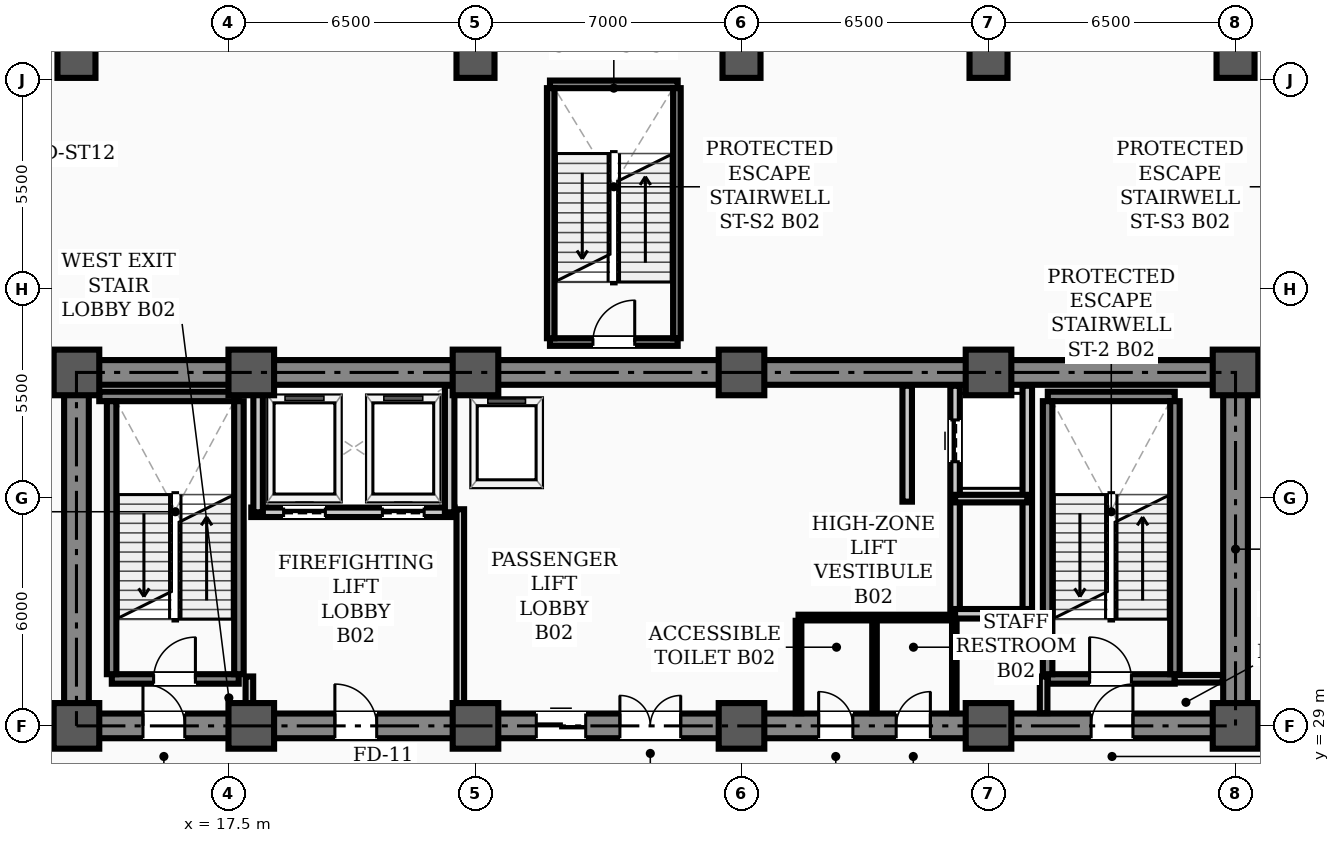
"""IFC4 building model, lengths in metres.
Left out: names, types, materials, properties, quantities, classifications, styles, units other than length and angle.
Written with IfcOpenShell. Run it as: python <this file> out.ifc"""

import sys

from ifc_helpers import new_model, si_unit, direction, frame, frame_2d, origin, origin_2d, place, context, subcontext, project, spatial, rectangle, hollow_rectangle, extrude, element, fill, save


model = new_model("IFC4")
c1 = context("Model", 3, precision=1e-05, world=origin(), true_north=direction((0.0, 1.0)))
c2 = subcontext(c1, "Body", "Model", "MODEL_VIEW")
j1 = project(units=[si_unit("LENGTHUNIT", "METRE"), si_unit("PLANEANGLEUNIT", "RADIAN")], contexts=[c1])
p1 = place(None, origin())
s1 = spatial("IfcSite", under=j1, at=p1, CompositionType="ELEMENT")
p2 = place(p1, origin())
s2 = spatial("IfcBuilding", under=s1, at=p2, CompositionType="ELEMENT")
p3 = place(p2, frame((0.0, 0.0, -10.2)))
s3 = spatial("IfcBuildingStorey", under=s2, at=p3, CompositionType="ELEMENT", Elevation=-10.2)
for number, where, z_axis, x_axis in (
    (1, (13.5, 29.0, 0.0), (0.0, 0.0, 1.0), (1.0, 0.0, 0.0)),
    (2, (13.5, 38.3, 0.0), (0.0, 0.0, 1.0), (1.0, 0.0, 0.0)),
    (3, (18.1, 29.0, 0.0), (0.0, 0.0, 1.0), (1.0, 0.0, 0.0)),
    (4, (18.1, 38.3, 0.0), (0.0, 0.0, 1.0), (1.0, 0.0, 0.0)),
    (5, (24.0, 29.0, 0.0), (0.0, 0.0, 1.0), (1.0, 0.0, 0.0)),
    (6, (24.0, 38.3, 0.0), (0.0, 0.0, 1.0), (1.0, 0.0, 0.0)),
    (7, (31.0, 29.0, 0.0), (0.0, 0.0, 1.0), (1.0, 0.0, 0.0)),
    (8, (31.0, 38.3, 0.0), (0.0, 0.0, 1.0), (1.0, 0.0, 0.0)),
    (9, (37.5, 29.0, 0.0), (0.0, 0.0, 1.0), (1.0, 0.0, 0.0)),
    (10, (37.5, 38.3, 0.0), (0.0, 0.0, 1.0), (1.0, 0.0, 0.0)),
    (11, (44.0, 29.0, 0.0), (0.0, 0.0, 1.0), (1.0, 0.0, 0.0)),
    (12, (44.0, 38.3, 0.0), (0.0, 0.0, 1.0), (1.0, 0.0, 0.0)),
):
    element("IfcColumn", number, at=place(p3, frame(where, z_axis=z_axis, x_axis=x_axis)), inside=s3, PredefinedType="COLUMN", context=c2, shape_type="SweptSolid", body=[
        extrude(hollow_rectangle(XDim=1.2, YDim=1.2, WallThickness=0.04, InnerFilletRadius=0.02, OuterFilletRadius=0.06, at=origin_2d()), origin(), (0.0, 0.0, 1.0), 5.2),
    ])
for number, where, z_axis, x_axis in (
    (13, (13.5, 46.55, 0.0), (0.0, 0.0, 1.0), (1.0, 0.0, 0.0)),
    (14, (24.0, 46.55, 0.0), (0.0, 0.0, 1.0), (1.0, 0.0, 0.0)),
    (15, (31.0, 46.55, 0.0), (0.0, 0.0, 1.0), (1.0, 0.0, 0.0)),
    (16, (37.5, 46.55, 0.0), (0.0, 0.0, 1.0), (1.0, 0.0, 0.0)),
    (17, (44.0, 46.55, 0.0), (0.0, 0.0, 1.0), (1.0, 0.0, 0.0)),
):
    element("IfcColumn", number, at=place(p3, frame(where, z_axis=z_axis, x_axis=x_axis)), inside=s3, PredefinedType="COLUMN", context=c2, shape_type="SweptSolid", body=[
        extrude(rectangle(XDim=1.0, YDim=1.0, at=origin_2d()), origin(), (0.0, 0.0, 1.0), 5.2),
    ])
p4 = place(p3, frame((13.5, 29.0, 0.0), z_axis=(0.0, 0.0, 1.0), x_axis=(1.0, 0.0, 0.0)))
e18 = element("IfcWall", 18, at=p4, inside=s3, PredefinedType="SHEAR", context=c2, shape_type="SweptSolid", body=[
    extrude(rectangle(XDim=30.5, YDim=0.65, at=frame_2d((15.25, 0.0))), origin(), (0.0, 0.0, 1.0), 4.92),
])
p5 = place(p4, frame((1.75, 0.0, 0.0)))
e19 = element("IfcOpeningElement", 19, at=p5, cuts=e18, PredefinedType="OPENING", context=c2, shape_type="SweptSolid", body=[
    extrude(rectangle(XDim=1.1, YDim=2.08, at=frame_2d((0.55, 1.04))), frame((0.0, 0.335, 0.0), z_axis=(0.0, -1.0, 0.0), x_axis=(1.0, 0.0, 0.0)), (0.0, 0.0, 1.0), 0.67),
])
p6 = place(p4, frame((26.7, 0.0, 0.0)))
e20 = element("IfcOpeningElement", 20, at=p6, cuts=e18, PredefinedType="OPENING", context=c2, shape_type="SweptSolid", body=[
    extrude(rectangle(XDim=1.1, YDim=2.08, at=frame_2d((0.55, 1.04))), frame((0.0, 0.335, 0.0), z_axis=(0.0, -1.0, 0.0), x_axis=(1.0, 0.0, 0.0)), (0.0, 0.0, 1.0), 0.67),
])
p7 = place(p4, frame((6.8, 0.0, 0.0)))
e21 = element("IfcOpeningElement", 21, at=p7, cuts=e18, PredefinedType="OPENING", context=c2, shape_type="SweptSolid", body=[
    extrude(rectangle(XDim=1.1, YDim=2.08, at=frame_2d((0.55, 1.04))), frame((0.0, 0.335, 0.0), z_axis=(0.0, -1.0, 0.0), x_axis=(1.0, 0.0, 0.0)), (0.0, 0.0, 1.0), 0.67),
])
p8 = place(p4, frame((14.3, 0.0, 0.0)))
e22 = element("IfcOpeningElement", 22, at=p8, cuts=e18, PredefinedType="OPENING", context=c2, shape_type="SweptSolid", body=[
    extrude(rectangle(XDim=1.6, YDim=2.08, at=frame_2d((0.8, 1.04))), frame((0.0, 0.335, 0.0), z_axis=(0.0, -1.0, 0.0), x_axis=(1.0, 0.0, 0.0)), (0.0, 0.0, 1.0), 0.67),
])
p9 = place(p4, frame((19.53, 0.0, 0.0)))
e23 = element("IfcOpeningElement", 23, at=p9, cuts=e18, PredefinedType="OPENING", context=c2, shape_type="SweptSolid", body=[
    extrude(rectangle(XDim=0.9, YDim=2.08, at=frame_2d((0.45, 1.04))), frame((0.0, 0.335, 0.0), z_axis=(0.0, -1.0, 0.0), x_axis=(1.0, 0.0, 0.0)), (0.0, 0.0, 1.0), 0.67),
])
p10 = place(p4, frame((21.57, 0.0, 0.0)))
e24 = element("IfcOpeningElement", 24, at=p10, cuts=e18, PredefinedType="OPENING", context=c2, shape_type="SweptSolid", body=[
    extrude(rectangle(XDim=0.9, YDim=2.08, at=frame_2d((0.45, 1.04))), frame((0.0, 0.335, 0.0), z_axis=(0.0, -1.0, 0.0), x_axis=(1.0, 0.0, 0.0)), (0.0, 0.0, 1.0), 0.67),
])
p11 = place(p4, frame((12.1, 0.0, 0.0)))
e25 = element("IfcOpeningElement", 25, at=p11, cuts=e18, PredefinedType="OPENING", context=c2, shape_type="SweptSolid", body=[
    extrude(rectangle(XDim=1.3, YDim=2.08, at=frame_2d((0.65, 1.04))), frame((0.0, 0.335, 0.0), z_axis=(0.0, -1.0, 0.0), x_axis=(1.0, 0.0, 0.0)), (0.0, 0.0, 1.0), 0.67),
])
p12 = place(p3, frame((13.5, 38.3, 0.0), z_axis=(0.0, 0.0, 1.0), x_axis=(1.0, 0.0, 0.0)))
e26 = element("IfcWall", 26, at=p12, inside=s3, PredefinedType="SHEAR", context=c2, shape_type="SweptSolid", body=[
    extrude(rectangle(XDim=30.5, YDim=0.65, at=frame_2d((15.25, 0.0))), origin(), (0.0, 0.0, 1.0), 4.92),
])
for number, where, z_axis, x_axis in (
    (27, (13.5, 29.35, 0.0), (0.0, 0.0, 1.0), (0.0, 1.0, 0.0)),
    (28, (44.0, 29.35, 0.0), (0.0, 0.0, 1.0), (0.0, 1.0, 0.0)),
):
    element("IfcWall", number, at=place(p3, frame(where, z_axis=z_axis, x_axis=x_axis)), inside=s3, PredefinedType="SHEAR", context=c2, shape_type="SweptSolid", body=[
        extrude(rectangle(XDim=8.6, YDim=0.65, at=frame_2d((4.3, 0.0))), origin(), (0.0, 0.0, 1.0), 4.92),
    ])
p13 = place(p3, frame((14.43, 30.235, 0.0), z_axis=(0.0, 0.0, 1.0), x_axis=(1.0, 0.0, 0.0)))
e29 = element("IfcWall", 29, at=p13, inside=s3, PredefinedType="STANDARD", context=c2, shape_type="SweptSolid", body=[
    extrude(rectangle(XDim=3.34, YDim=0.25, at=frame_2d((1.67, 0.0))), origin(), (0.0, 0.0, 1.0), 4.92),
])
p14 = place(p13, frame((1.1, 0.0, 0.0)))
e30 = element("IfcOpeningElement", 30, at=p14, cuts=e29, PredefinedType="OPENING", context=c2, shape_type="SweptSolid", body=[
    extrude(rectangle(XDim=1.1, YDim=2.08, at=frame_2d((0.55, 1.04))), frame((0.0, 0.135, 0.0), z_axis=(0.0, -1.0, 0.0), x_axis=(1.0, 0.0, 0.0)), (0.0, 0.0, 1.0), 0.27),
])
p15 = place(p3, frame((14.1, 37.669, 0.0), z_axis=(0.0, 0.0, 1.0), x_axis=(1.0, 0.0, 0.0)))
e31 = element("IfcWall", 31, at=p15, inside=s3, PredefinedType="STANDARD", context=c2, shape_type="SweptSolid", body=[
    extrude(rectangle(XDim=3.67, YDim=0.25, at=frame_2d((1.835, 0.0))), origin(), (0.0, 0.0, 1.0), 4.92),
])
for number, where, z_axis, x_axis in (
    (32, (14.425, 30.36, 0.0), (0.0, 0.0, 1.0), (0.0, 1.0, 0.0)),
    (33, (17.775, 30.36, 0.0), (0.0, 0.0, 1.0), (0.0, 1.0, 0.0)),
):
    element("IfcWall", number, at=place(p3, frame(where, z_axis=z_axis, x_axis=x_axis)), inside=s3, PredefinedType="STANDARD", context=c2, shape_type="SweptSolid", body=[
        extrude(rectangle(XDim=7.184, YDim=0.25, at=frame_2d((3.592, 0.0))), origin(), (0.0, 0.0, 1.0), 4.92),
    ])
p16 = place(p3, frame((39.06, 30.235, 0.0), z_axis=(0.0, 0.0, 1.0), x_axis=(1.0, 0.0, 0.0)))
e34 = element("IfcWall", 34, at=p16, inside=s3, PredefinedType="STANDARD", context=c2, shape_type="SweptSolid", body=[
    extrude(rectangle(XDim=3.34, YDim=0.25, at=frame_2d((1.67, 0.0))), origin(), (0.0, 0.0, 1.0), 4.92),
])
p17 = place(p16, frame((1.1, 0.0, 0.0)))
e35 = element("IfcOpeningElement", 35, at=p17, cuts=e34, PredefinedType="OPENING", context=c2, shape_type="SweptSolid", body=[
    extrude(rectangle(XDim=1.1, YDim=2.08, at=frame_2d((0.55, 1.04))), frame((0.0, 0.135, 0.0), z_axis=(0.0, -1.0, 0.0), x_axis=(1.0, 0.0, 0.0)), (0.0, 0.0, 1.0), 0.27),
])
p18 = place(p3, frame((39.06, 37.669, 0.0), z_axis=(0.0, 0.0, 1.0), x_axis=(1.0, 0.0, 0.0)))
e36 = element("IfcWall", 36, at=p18, inside=s3, PredefinedType="STANDARD", context=c2, shape_type="SweptSolid", body=[
    extrude(rectangle(XDim=3.34, YDim=0.25, at=frame_2d((1.67, 0.0))), origin(), (0.0, 0.0, 1.0), 4.92),
])
for number, where, z_axis, x_axis in (
    (37, (39.055, 30.36, 0.0), (0.0, 0.0, 1.0), (0.0, 1.0, 0.0)),
    (38, (42.405, 30.36, 0.0), (0.0, 0.0, 1.0), (0.0, 1.0, 0.0)),
):
    element("IfcWall", number, at=place(p3, frame(where, z_axis=z_axis, x_axis=x_axis)), inside=s3, PredefinedType="STANDARD", context=c2, shape_type="SweptSolid", body=[
        extrude(rectangle(XDim=7.184, YDim=0.25, at=frame_2d((3.592, 0.0))), origin(), (0.0, 0.0, 1.0), 4.92),
    ])
p19 = place(p3, frame((18.1, 34.62, 0.0), z_axis=(0.0, 0.0, 1.0), x_axis=(1.0, 0.0, 0.0)))
e39 = element("IfcWall", 39, at=p19, inside=s3, PredefinedType="STANDARD", context=c2, shape_type="SweptSolid", body=[
    extrude(rectangle(XDim=5.35, YDim=0.25, at=frame_2d((2.675, 0.0))), origin(), (0.0, 0.0, 1.0), 4.2),
])
p20 = place(p19, frame((0.85, 0.0, 0.0)))
e40 = element("IfcOpeningElement", 40, at=p20, cuts=e39, PredefinedType="OPENING", context=c2, shape_type="SweptSolid", body=[
    extrude(rectangle(XDim=1.1, YDim=2.08, at=frame_2d((0.55, 1.04))), frame((0.0, 0.135, 0.0), z_axis=(0.0, -1.0, 0.0), x_axis=(1.0, 0.0, 0.0)), (0.0, 0.0, 1.0), 0.27),
])
p21 = place(p19, frame((3.45, 0.0, 0.0)))
e41 = element("IfcOpeningElement", 41, at=p21, cuts=e39, PredefinedType="OPENING", context=c2, shape_type="SweptSolid", body=[
    extrude(rectangle(XDim=1.1, YDim=2.08, at=frame_2d((0.55, 1.04))), frame((0.0, 0.135, 0.0), z_axis=(0.0, -1.0, 0.0), x_axis=(1.0, 0.0, 0.0)), (0.0, 0.0, 1.0), 0.27),
])
p22 = place(p3, frame((36.62, 31.95, 0.0), z_axis=(0.0, 0.0, 1.0), x_axis=(0.0, 1.0, 0.0)))
e42 = element("IfcWall", 42, at=p22, inside=s3, PredefinedType="STANDARD", context=c2, shape_type="SweptSolid", body=[
    extrude(rectangle(XDim=6.0, YDim=0.25, at=frame_2d((3.0, 0.0))), origin(), (0.0, 0.0, 1.0), 4.1),
])
p23 = place(p22, frame((4.0, 0.0, 0.0)))
e43 = element("IfcOpeningElement", 43, at=p23, cuts=e42, PredefinedType="OPENING", context=c2, shape_type="SweptSolid", body=[
    extrude(rectangle(XDim=1.1, YDim=2.08, at=frame_2d((0.55, 1.04))), frame((0.0, 0.135, 0.0), z_axis=(0.0, -1.0, 0.0), x_axis=(1.0, 0.0, 0.0)), (0.0, 0.0, 1.0), 0.27),
])
p24 = place(p3, frame((38.52, 31.95, 0.0), z_axis=(0.0, 0.0, 1.0), x_axis=(0.0, 1.0, 0.0)))
e44 = element("IfcWall", 44, at=p24, inside=s3, PredefinedType="STANDARD", context=c2, shape_type="SweptSolid", body=[
    extrude(rectangle(XDim=6.0, YDim=0.25, at=frame_2d((3.0, 0.0))), origin(), (0.0, 0.0, 1.0), 4.1),
])
p25 = place(p3, frame((36.62, 31.95, 0.0), z_axis=(0.0, 0.0, 1.0), x_axis=(1.0, 0.0, 0.0)))
e45 = element("IfcWall", 45, at=p25, inside=s3, PredefinedType="STANDARD", context=c2, shape_type="SweptSolid", body=[
    extrude(rectangle(XDim=1.9, YDim=0.25, at=frame_2d((0.95, 0.0))), origin(), (0.0, 0.0, 1.0), 4.78),
])
for number, where, z_axis, x_axis in (
    (46, (18.28, 34.62, 0.0), (0.0, 0.0, 1.0), (0.0, 1.0, 0.0)),
    (47, (23.32, 34.62, 0.0), (0.0, 0.0, 1.0), (0.0, 1.0, 0.0)),
):
    element("IfcWall", number, at=place(p3, frame(where, z_axis=z_axis, x_axis=x_axis)), inside=s3, PredefinedType="STANDARD", context=c2, shape_type="SweptSolid", body=[
        extrude(rectangle(XDim=3.33, YDim=0.25, at=frame_2d((1.665, 0.0))), origin(), (0.0, 0.0, 1.0), 4.1),
    ])
p26 = place(p3, frame((35.36, 34.9, 0.0), z_axis=(0.0, 0.0, 1.0), x_axis=(0.0, 1.0, 0.0)))
e48 = element("IfcWall", 48, at=p26, inside=s3, PredefinedType="STANDARD", context=c2, shape_type="SweptSolid", body=[
    extrude(rectangle(XDim=3.05, YDim=0.25, at=frame_2d((1.525, 0.0))), origin(), (0.0, 0.0, 1.0), 4.1),
])
p27 = place(p3, frame((25.96, 39.1, 0.0), z_axis=(0.0, 0.0, 1.0), x_axis=(1.0, 0.0, 0.0)))
e49 = element("IfcWall", 49, at=p27, inside=s3, PredefinedType="STANDARD", context=c2, shape_type="SweptSolid", body=[
    extrude(rectangle(XDim=3.36, YDim=0.2, at=frame_2d((1.68, 0.0))), origin(), (0.0, 0.0, 1.0), 4.92),
])
p28 = place(p27, frame((1.13, 0.0, 0.0)))
e50 = element("IfcOpeningElement", 50, at=p28, cuts=e49, PredefinedType="OPENING", context=c2, shape_type="SweptSolid", body=[
    extrude(rectangle(XDim=1.1, YDim=2.08, at=frame_2d((0.55, 1.04))), frame((0.0, 0.11, 0.0), z_axis=(0.0, -1.0, 0.0), x_axis=(1.0, 0.0, 0.0)), (0.0, 0.0, 1.0), 0.22),
])
p29 = place(p3, frame((25.96, 45.88, 0.0), z_axis=(0.0, 0.0, 1.0), x_axis=(1.0, 0.0, 0.0)))
e51 = element("IfcWall", 51, at=p29, inside=s3, PredefinedType="STANDARD", context=c2, shape_type="SweptSolid", body=[
    extrude(rectangle(XDim=3.36, YDim=0.2, at=frame_2d((1.68, 0.0))), origin(), (0.0, 0.0, 1.0), 4.92),
])
for number, where, z_axis, x_axis in (
    (52, (25.98, 39.2, 0.0), (0.0, 0.0, 1.0), (0.0, 1.0, 0.0)),
    (53, (29.3, 39.2, 0.0), (0.0, 0.0, 1.0), (0.0, 1.0, 0.0)),
):
    element("IfcWall", number, at=place(p3, frame(where, z_axis=z_axis, x_axis=x_axis)), inside=s3, PredefinedType="STANDARD", context=c2, shape_type="SweptSolid", body=[
        extrude(rectangle(XDim=6.58, YDim=0.2, at=frame_2d((3.29, 0.0))), origin(), (0.0, 0.0, 1.0), 4.92),
    ])
p30 = place(p3, frame((42.4, 30.24, 0.0), z_axis=(0.0, 0.0, 1.0), x_axis=(1.0, 0.0, 0.0)))
e54 = element("IfcWall", 54, at=p30, inside=s3, PredefinedType="STANDARD", context=c2, shape_type="SweptSolid", body=[
    extrude(rectangle(XDim=1.265, YDim=0.2, at=frame_2d((0.633, 0.0))), origin(), (0.0, 0.0, 1.0), 4.2),
])
p31 = place(p3, frame((32.5, 31.85, 0.0), z_axis=(0.0, 0.0, 1.0), x_axis=(1.0, 0.0, 0.0)))
e55 = element("IfcWall", 55, at=p31, inside=s3, PredefinedType="PARTITIONING", context=c2, shape_type="SweptSolid", body=[
    extrude(rectangle(XDim=4.1, YDim=0.15, at=frame_2d((2.05, 0.0))), origin(), (0.0, 0.0, 1.0), 4.45),
])
for number, where, z_axis, x_axis in (
    (56, (18.05, 29.335, 0.0), (0.0, 0.0, 1.0), (0.0, 1.0, 0.0)),
    (57, (38.95, 29.335, 0.0), (0.0, 0.0, 1.0), (0.0, 1.0, 0.0)),
):
    element("IfcWall", number, at=place(p3, frame(where, z_axis=z_axis, x_axis=x_axis)), inside=s3, PredefinedType="STANDARD", context=c2, shape_type="SweptSolid", body=[
        extrude(rectangle(XDim=0.965, YDim=0.2, at=frame_2d((0.482, 0.0))), origin(), (0.0, 0.0, 1.0), 4.1),
    ])
p32 = place(p3, frame((23.6, 29.335, 0.0), z_axis=(0.0, 0.0, 1.0), x_axis=(0.0, 1.0, 0.0)))
e58 = element("IfcWall", 58, at=p32, inside=s3, PredefinedType="STANDARD", context=c2, shape_type="SweptSolid", body=[
    extrude(rectangle(XDim=5.365, YDim=0.2, at=frame_2d((2.683, 0.0))), origin(), (0.0, 0.0, 1.0), 4.1),
])
p33 = place(p3, frame((32.5, 29.335, 0.0), z_axis=(0.0, 0.0, 1.0), x_axis=(0.0, 1.0, 0.0)))
e59 = element("IfcWall", 59, at=p33, inside=s3, PredefinedType="PARTITIONING", context=c2, shape_type="SweptSolid", body=[
    extrude(rectangle(XDim=2.43, YDim=0.15, at=frame_2d((1.215, 0.0))), origin(), (0.0, 0.0, 1.0), 4.1),
])
for number, where, z_axis, x_axis in (
    (60, (36.6, 29.335, 0.0), (0.0, 0.0, 1.0), (0.0, 1.0, 0.0)),
    (61, (34.5, 29.335, 0.0), (0.0, 0.0, 1.0), (0.0, 1.0, 0.0)),
):
    element("IfcWall", number, at=place(p3, frame(where, z_axis=z_axis, x_axis=x_axis)), inside=s3, PredefinedType="PARTITIONING", context=c2, shape_type="SweptSolid", body=[
        extrude(rectangle(XDim=2.43, YDim=0.12, at=frame_2d((1.215, 0.0))), origin(), (0.0, 0.0, 1.0), 4.1),
    ])
p34 = place(p3, frame((36.62, 34.98, 0.0), z_axis=(0.0, 0.0, 1.0), x_axis=(1.0, 0.0, 0.0)))
e62 = element("IfcWall", 62, at=p34, inside=s3, PredefinedType="STANDARD", context=c2, shape_type="SweptSolid", body=[
    extrude(rectangle(XDim=1.9, YDim=0.2, at=frame_2d((0.95, 0.0))), origin(), (0.0, 0.0, 1.0), 4.92),
])
p35 = place(p14, origin())
e63 = element("IfcDoor", 63, at=p35, inside=s3, OperationType="SINGLE_SWING_RIGHT", PredefinedType="DOOR", context=c2, shape_type="SweptSolid", body=[
    extrude(rectangle(XDim=1.1, YDim=2.08, at=frame_2d((0.55, 1.04))), frame((0.0, 0.025, 0.0), z_axis=(0.0, -1.0, 0.0), x_axis=(1.0, 0.0, 0.0)), (0.0, 0.0, 1.0), 0.05),
])
fill(e30, e63)
p36 = place(p17, origin())
e64 = element("IfcDoor", 64, at=p36, inside=s3, OperationType="SINGLE_SWING_LEFT", PredefinedType="DOOR", context=c2, shape_type="SweptSolid", body=[
    extrude(rectangle(XDim=1.1, YDim=2.08, at=frame_2d((0.55, 1.04))), frame((0.0, 0.025, 0.0), z_axis=(0.0, -1.0, 0.0), x_axis=(1.0, 0.0, 0.0)), (0.0, 0.0, 1.0), 0.05),
])
fill(e35, e64)
p37 = place(p28, origin())
e65 = element("IfcDoor", 65, at=p37, inside=s3, OperationType="SINGLE_SWING_RIGHT", PredefinedType="DOOR", context=c2, shape_type="SweptSolid", body=[
    extrude(rectangle(XDim=1.1, YDim=2.08, at=frame_2d((0.55, 1.04))), frame((0.0, 0.025, 0.0), z_axis=(0.0, -1.0, 0.0), x_axis=(1.0, 0.0, 0.0)), (0.0, 0.0, 1.0), 0.05),
])
fill(e50, e65)
p38 = place(p5, origin())
e66 = element("IfcDoor", 66, at=p38, inside=s3, OperationType="SINGLE_SWING_LEFT", PredefinedType="DOOR", context=c2, shape_type="SweptSolid", body=[
    extrude(rectangle(XDim=1.1, YDim=2.08, at=frame_2d((0.55, 1.04))), frame((0.0, 0.025, 0.0), z_axis=(0.0, -1.0, 0.0), x_axis=(1.0, 0.0, 0.0)), (0.0, 0.0, 1.0), 0.05),
])
fill(e19, e66)
p39 = place(p6, origin())
e67 = element("IfcDoor", 67, at=p39, inside=s3, OperationType="SINGLE_SWING_RIGHT", PredefinedType="DOOR", context=c2, shape_type="SweptSolid", body=[
    extrude(rectangle(XDim=1.1, YDim=2.08, at=frame_2d((0.55, 1.04))), frame((0.0, 0.025, 0.0), z_axis=(0.0, -1.0, 0.0), x_axis=(1.0, 0.0, 0.0)), (0.0, 0.0, 1.0), 0.05),
])
fill(e20, e67)
p40 = place(p7, origin())
e68 = element("IfcDoor", 68, at=p40, inside=s3, OperationType="SINGLE_SWING_LEFT", PredefinedType="DOOR", context=c2, shape_type="SweptSolid", body=[
    extrude(rectangle(XDim=1.1, YDim=2.08, at=frame_2d((0.55, 1.04))), frame((0.0, 0.025, 0.0), z_axis=(0.0, -1.0, 0.0), x_axis=(1.0, 0.0, 0.0)), (0.0, 0.0, 1.0), 0.05),
])
fill(e21, e68)
p41 = place(p8, origin())
e69 = element("IfcDoor", 69, at=p41, inside=s3, OperationType="DOUBLE_DOOR_SINGLE_SWING", PredefinedType="DOOR", context=c2, shape_type="SweptSolid", body=[
    extrude(rectangle(XDim=1.6, YDim=2.08, at=frame_2d((0.8, 1.04))), frame((0.0, 0.025, 0.0), z_axis=(0.0, -1.0, 0.0), x_axis=(1.0, 0.0, 0.0)), (0.0, 0.0, 1.0), 0.05),
])
fill(e22, e69)
p42 = place(p9, origin())
e70 = element("IfcDoor", 70, at=p42, inside=s3, OperationType="SINGLE_SWING_LEFT", PredefinedType="DOOR", context=c2, shape_type="SweptSolid", body=[
    extrude(rectangle(XDim=0.9, YDim=2.08, at=frame_2d((0.45, 1.04))), frame((0.0, 0.025, 0.0), z_axis=(0.0, -1.0, 0.0), x_axis=(1.0, 0.0, 0.0)), (0.0, 0.0, 1.0), 0.05),
])
fill(e23, e70)
p43 = place(p10, origin())
e71 = element("IfcDoor", 71, at=p43, inside=s3, OperationType="SINGLE_SWING_RIGHT", PredefinedType="DOOR", context=c2, shape_type="SweptSolid", body=[
    extrude(rectangle(XDim=0.9, YDim=2.08, at=frame_2d((0.45, 1.04))), frame((0.0, 0.025, 0.0), z_axis=(0.0, -1.0, 0.0), x_axis=(1.0, 0.0, 0.0)), (0.0, 0.0, 1.0), 0.05),
])
fill(e24, e71)
p44 = place(p20, origin())
e72 = element("IfcDoor", 72, at=p44, inside=s3, OperationType="SLIDING_TO_LEFT", PredefinedType="DOOR", context=c2, shape_type="SweptSolid", body=[
    extrude(rectangle(XDim=1.1, YDim=2.08, at=frame_2d((0.55, 1.04))), frame((0.0, 0.025, 0.0), z_axis=(0.0, -1.0, 0.0), x_axis=(1.0, 0.0, 0.0)), (0.0, 0.0, 1.0), 0.05),
])
fill(e40, e72)
p45 = place(p21, origin())
e73 = element("IfcDoor", 73, at=p45, inside=s3, OperationType="SLIDING_TO_LEFT", PredefinedType="DOOR", context=c2, shape_type="SweptSolid", body=[
    extrude(rectangle(XDim=1.1, YDim=2.08, at=frame_2d((0.55, 1.04))), frame((0.0, 0.025, 0.0), z_axis=(0.0, -1.0, 0.0), x_axis=(1.0, 0.0, 0.0)), (0.0, 0.0, 1.0), 0.05),
])
fill(e41, e73)
p46 = place(p23, origin())
e74 = element("IfcDoor", 74, at=p46, inside=s3, OperationType="SLIDING_TO_LEFT", PredefinedType="DOOR", context=c2, shape_type="SweptSolid", body=[
    extrude(rectangle(XDim=1.1, YDim=2.08, at=frame_2d((0.55, 1.04))), frame((0.0, 0.025, 0.0), z_axis=(0.0, -1.0, 0.0), x_axis=(1.0, 0.0, 0.0)), (0.0, 0.0, 1.0), 0.05),
])
fill(e43, e74)
p47 = place(p11, origin())
e75 = element("IfcDoor", 75, at=p47, inside=s3, OperationType="DOUBLE_DOOR_SLIDING", PredefinedType="DOOR", context=c2, shape_type="SweptSolid", body=[
    extrude(rectangle(XDim=1.3, YDim=2.08, at=frame_2d((0.65, 1.04))), frame((0.0, 0.025, 0.0), z_axis=(0.0, -1.0, 0.0), x_axis=(1.0, 0.0, 0.0)), (0.0, 0.0, 1.0), 0.05),
])
fill(e25, e75)
save(model, sys.argv[1])
